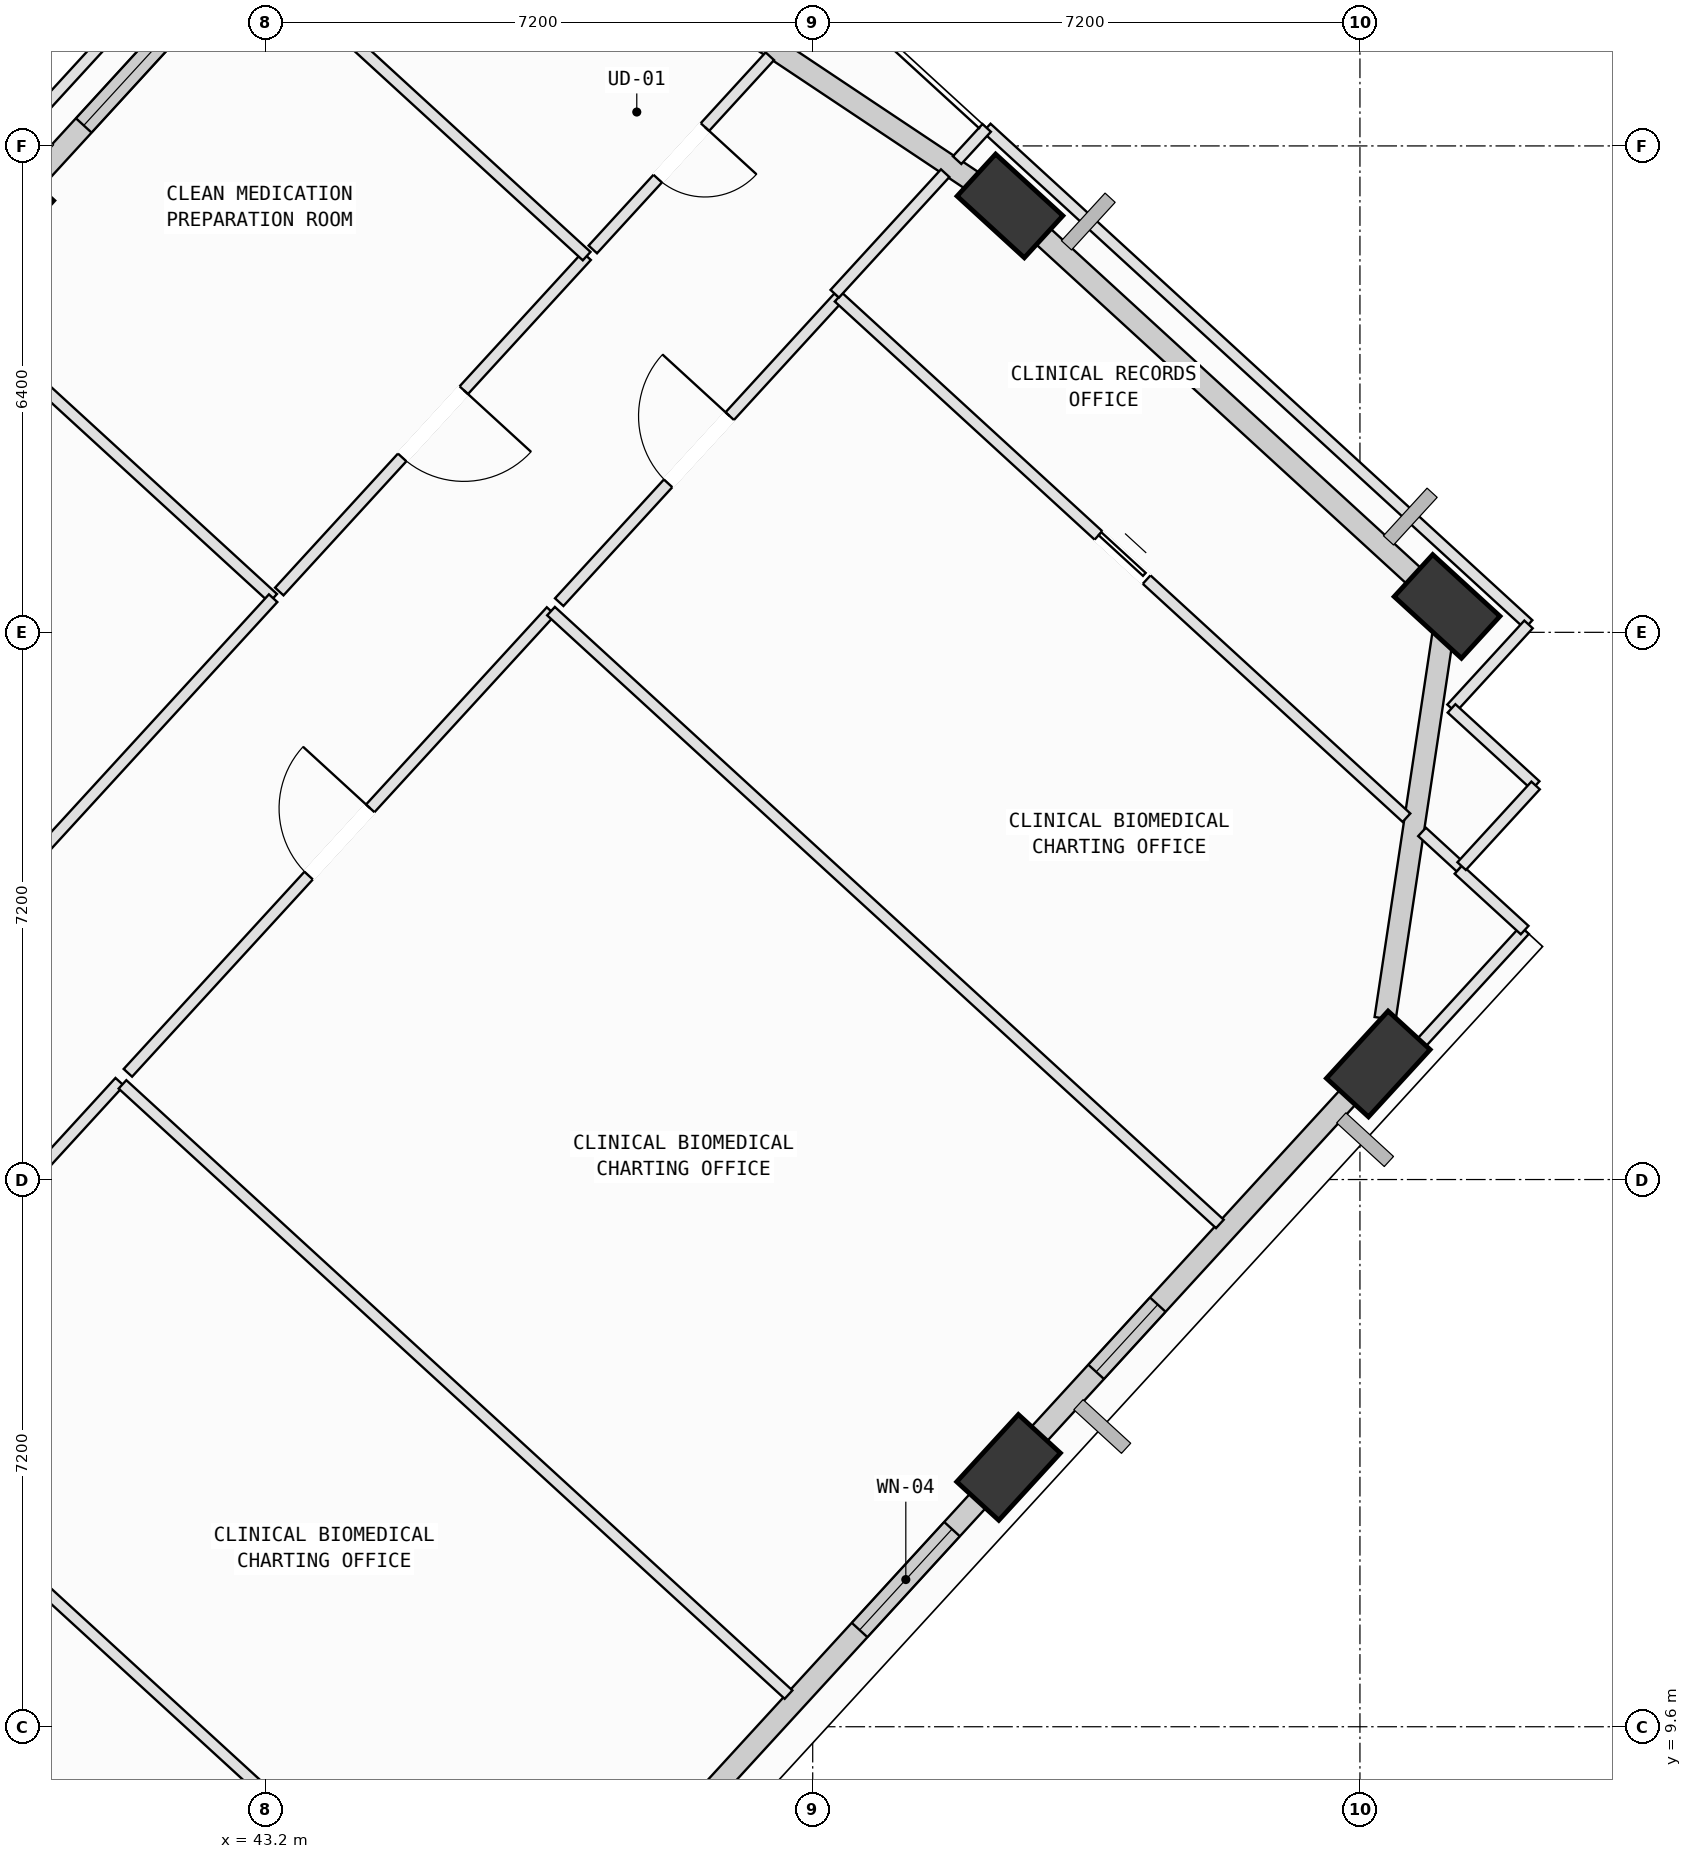
"""IFC4 building model, lengths in metres.
Left out: names, types, materials, properties, quantities, classifications, styles, units other than length and angle.
Written with IfcOpenShell. Run it as: python <this file> out.ifc"""

import sys

from ifc_helpers import new_model, si_unit, direction, frame, frame_2d, origin, origin_2d, place, context, subcontext, project, spatial, rectangle, extrude, element, fill, save


model = new_model("IFC4")
c1 = context("Model", 3, precision=1e-05, world=origin(), true_north=direction((0.0, 1.0)))
c2 = subcontext(c1, "Body", "Model", "MODEL_VIEW")
j1 = project(units=[si_unit("LENGTHUNIT", "METRE"), si_unit("PLANEANGLEUNIT", "RADIAN")], contexts=[c1])
p1 = place(None, origin())
s1 = spatial("IfcSite", under=j1, at=p1, CompositionType="ELEMENT")
p2 = place(p1, origin())
s2 = spatial("IfcBuilding", under=s1, at=p2, CompositionType="ELEMENT")
p3 = place(p2, frame((0.0, 0.0, 227.2)))
s3 = spatial("IfcBuildingStorey", under=s2, at=p3, CompositionType="ELEMENT", Elevation=227.2)
p4 = place(p3, frame((52.977, 13.012, 0.002), z_axis=(0.047989081714, 0.080407561502, 0.995606183232), x_axis=(-0.956311257313, -0.284081872205, 0.069038170754)))
e1 = element("IfcColumn", 1, at=p4, inside=s3, PredefinedType="COLUMN", context=c2, shape_type="SweptSolid", body=[
    extrude(rectangle(XDim=1.2, YDim=0.75, at=origin_2d()), origin(), (0.0, 0.0, 1.0), 4.014),
])
p5 = place(p3, frame((57.841, 18.321, 0.002), z_axis=(0.025885225997, 0.100138151274, 0.994636770753), x_axis=(-0.837618446054, -0.540906931878, 0.076256343195)))
e2 = element("IfcColumn", 2, at=p5, inside=s3, PredefinedType="COLUMN", context=c2, shape_type="SweptSolid", body=[
    extrude(rectangle(XDim=1.2, YDim=0.75, at=origin_2d()), origin(), (0.0, 0.0, 1.0), 4.018),
])
p6 = place(p3, frame((58.746, 24.341, 0.002), z_axis=(0.001032953055, 0.103659877118, 0.994612267612), x_axis=(0.730545196332, -0.679263427848, 0.07003507481)))
e3 = element("IfcColumn", 3, at=p6, inside=s3, PredefinedType="COLUMN", context=c2, shape_type="SweptSolid", body=[
    extrude(rectangle(XDim=1.2, YDim=0.75, at=origin_2d()), origin(), (0.0, 0.0, 1.0), 4.018),
])
p7 = place(p3, frame((52.995, 29.611, 0.002), z_axis=(-0.020517462965, 0.079938958081, 0.996588579452), x_axis=(0.881513138055, -0.468855845143, 0.05575646968)))
e4 = element("IfcColumn", 4, at=p7, inside=s3, PredefinedType="COLUMN", context=c2, shape_type="SweptSolid", body=[
    extrude(rectangle(XDim=1.2, YDim=0.75, at=origin_2d()), origin(), (0.0, 0.0, 1.0), 4.01),
])
p8 = place(p3, frame((52.834, 12.856, 0.0), z_axis=(0.0, 0.0, 1.0), x_axis=(-0.675586571209, -0.737280668946, 0.0)))
e5 = element("IfcWall", 5, at=p8, inside=s3, PredefinedType="SOLIDWALL", context=c2, shape_type="SweptSolid", body=[
    extrude(rectangle(XDim=6.407, YDim=0.28, at=frame_2d((3.203, 0.0))), origin(), (0.0, 0.0, 1.0), 3.265),
])
p9 = place(p8, frame((0.89, 0.0, 0.75)))
e6 = element("IfcOpeningElement", 6, at=p9, cuts=e5, PredefinedType="OPENING", context=c2, shape_type="SweptSolid", body=[
    extrude(rectangle(XDim=1.8, YDim=2.05, at=frame_2d((0.9, 1.025))), frame((0.0, 0.15, 0.0), z_axis=(0.0, -1.0, 0.0), x_axis=(1.0, 0.0, 0.0)), (0.0, 0.0, 1.0), 0.3),
])
p10 = place(p3, frame((57.705, 18.172, 0.0), z_axis=(0.0, 0.0, 1.0), x_axis=(-0.675585097516, -0.737282019321, 0.0)))
e7 = element("IfcWall", 7, at=p10, inside=s3, PredefinedType="SOLIDWALL", context=c2, shape_type="SweptSolid", body=[
    extrude(rectangle(XDim=6.418, YDim=0.28, at=frame_2d((3.209, 0.0))), origin(), (0.0, 0.0, 1.0), 3.265),
])
p11 = place(p10, frame((4.093, 0.0, 0.75)))
e8 = element("IfcOpeningElement", 8, at=p11, cuts=e7, PredefinedType="OPENING", context=c2, shape_type="SweptSolid", body=[
    extrude(rectangle(XDim=1.2, YDim=1.75, at=frame_2d((0.6, 0.875))), frame((0.0, 0.15, 0.0), z_axis=(0.0, -1.0, 0.0), x_axis=(1.0, 0.0, 0.0)), (0.0, 0.0, 1.0), 0.3),
])
p12 = place(p3, frame((58.718, 24.153, 0.0), z_axis=(0.0, 0.0, 1.0), x_axis=(-0.148680965194, -0.988885216084, 0.0)))
e9 = element("IfcWall", 9, at=p12, inside=s3, PredefinedType="SOLIDWALL", context=c2, shape_type="SweptSolid", body=[
    extrude(rectangle(XDim=5.294, YDim=0.28, at=frame_2d((2.647, 0.0))), origin(), (0.0, 0.0, 1.0), 3.265),
])
p13 = place(p3, frame((53.179, 29.443, 0.0), z_axis=(0.0, 0.0, 1.0), x_axis=(0.737270624316, -0.675597532945, 0.0)))
e10 = element("IfcWall", 10, at=p13, inside=s3, PredefinedType="SOLIDWALL", context=c2, shape_type="SweptSolid", body=[
    extrude(rectangle(XDim=7.046, YDim=0.28, at=frame_2d((3.523, 0.0))), origin(), (0.0, 0.0, 1.0), 3.265),
])
p14 = place(p3, frame((45.058, 34.906, 0.0), z_axis=(0.0, 0.0, 1.0), x_axis=(0.831863197992, -0.554980738249, 0.0)))
e11 = element("IfcWall", 11, at=p14, inside=s3, PredefinedType="SOLIDWALL", context=c2, shape_type="SweptSolid", body=[
    extrude(rectangle(XDim=9.036, YDim=0.28, at=frame_2d((4.518, 0.0))), origin(), (0.0, 0.0, 1.0), 3.265),
])
p15 = place(p3, frame((40.002, 29.789, 0.0), z_axis=(0.0, 0.0, 1.0), x_axis=(0.675590903353, 0.737276699283, 0.0)))
e12 = element("IfcWall", 12, at=p15, inside=s3, PredefinedType="SOLIDWALL", context=c2, shape_type="SweptSolid", body=[
    extrude(rectangle(XDim=6.78, YDim=0.28, at=frame_2d((3.39, 0.0))), origin(), (0.0, 0.0, 1.0), 3.165),
])
p16 = place(p15, frame((1.195, 0.0, 0.75)))
e13 = element("IfcOpeningElement", 13, at=p16, cuts=e12, PredefinedType="OPENING", context=c2, shape_type="SweptSolid", body=[
    extrude(rectangle(XDim=1.8, YDim=2.05, at=frame_2d((0.9, 1.025))), frame((0.0, 0.15, 0.0), z_axis=(0.0, -1.0, 0.0), x_axis=(1.0, 0.0, 0.0)), (0.0, 0.0, 1.0), 0.3),
])
p17 = place(p3, frame((37.499, 13.957, 0.0), z_axis=(0.0, 0.0, 1.0), x_axis=(0.737309503426, -0.675555102237, 0.0)))
e14 = element("IfcWall", 14, at=p17, inside=s3, PredefinedType="PARTITIONING", context=c2, shape_type="SweptSolid", body=[
    extrude(rectangle(XDim=11.935, YDim=0.15, at=frame_2d((5.968, 0.0))), origin(), (0.0, 0.0, 1.0), 3.78),
])
p18 = place(p3, frame((37.607, 14.075, 0.0), z_axis=(0.0, 0.0, 1.0), x_axis=(0.67555593544, 0.737308740008, 0.0)))
e15 = element("IfcWall", 15, at=p18, inside=s3, PredefinedType="PARTITIONING", context=c2, shape_type="SweptSolid", body=[
    extrude(rectangle(XDim=5.44, YDim=0.15, at=frame_2d((2.72, 0.0))), origin(), (0.0, 0.0, 1.0), 3.78),
])
p19 = place(p18, frame((2.12, 0.0, 0.0)))
e16 = element("IfcOpeningElement", 16, at=p19, cuts=e15, PredefinedType="OPENING", context=c2, shape_type="SweptSolid", body=[
    extrude(rectangle(XDim=1.2, YDim=2.15, at=frame_2d((0.6, 1.075))), frame((0.0, 0.085, 0.0), z_axis=(0.0, -1.0, 0.0), x_axis=(1.0, 0.0, 0.0)), (0.0, 0.0, 1.0), 0.17),
])
p20 = place(p3, frame((41.319, 18.052, 0.0), z_axis=(0.0, 0.0, 1.0), x_axis=(0.73730675083, -0.675558106443, 0.0)))
e17 = element("IfcWall", 17, at=p20, inside=s3, PredefinedType="PARTITIONING", context=c2, shape_type="SweptSolid", body=[
    extrude(rectangle(XDim=11.885, YDim=0.15, at=frame_2d((5.942, 0.0))), origin(), (0.0, 0.0, 1.0), 3.78),
])
p21 = place(p3, frame((41.39, 18.204, 0.0), z_axis=(0.0, 0.0, 1.0), x_axis=(0.67562131305, 0.737248832724, 0.0)))
e18 = element("IfcWall", 18, at=p21, inside=s3, PredefinedType="PARTITIONING", context=c2, shape_type="SweptSolid", body=[
    extrude(rectangle(XDim=8.24, YDim=0.15, at=frame_2d((4.12, 0.0))), origin(), (0.0, 0.0, 1.0), 3.78),
])
p22 = place(p21, frame((3.52, 0.0, 0.0)))
e19 = element("IfcOpeningElement", 19, at=p22, cuts=e18, PredefinedType="OPENING", context=c2, shape_type="SweptSolid", body=[
    extrude(rectangle(XDim=1.2, YDim=2.15, at=frame_2d((0.6, 1.075))), frame((0.0, 0.085, 0.0), z_axis=(0.0, -1.0, 0.0), x_axis=(1.0, 0.0, 0.0)), (0.0, 0.0, 1.0), 0.17),
])
p23 = place(p3, frame((46.957, 24.279, 0.0), z_axis=(0.0, 0.0, 1.0), x_axis=(0.737309503426, -0.675555102237, 0.0)))
e20 = element("IfcWall", 20, at=p23, inside=s3, PredefinedType="PARTITIONING", context=c2, shape_type="SweptSolid", body=[
    extrude(rectangle(XDim=11.935, YDim=0.15, at=frame_2d((5.968, 0.0))), origin(), (0.0, 0.0, 1.0), 3.78),
])
p24 = place(p3, frame((53.538, 13.285, 0.0), z_axis=(0.0, 0.0, 1.0), x_axis=(-0.675612964581, -0.737256483247, 0.0)))
e21 = element("IfcWall", 21, at=p24, inside=s3, PredefinedType="PARTITIONING", context=c2, shape_type="SweptSolid", body=[
    extrude(rectangle(XDim=0.792, YDim=0.15, at=frame_2d((0.396, 0.0))), origin(), (0.0, 0.0, 1.0), 3.265),
])
p25 = place(p3, frame((59.767, 20.082, 0.0), z_axis=(0.0, 0.0, 1.0), x_axis=(-0.675764091875, -0.737117963512, 0.0)))
e22 = element("IfcWall", 22, at=p25, inside=s3, PredefinedType="PARTITIONING", context=c2, shape_type="SweptSolid", body=[
    extrude(rectangle(XDim=2.801, YDim=0.15, at=frame_2d((1.401, 0.0))), origin(), (0.0, 0.0, 1.0), 3.265),
])
p26 = place(p3, frame((47.065, 24.397, 0.0), z_axis=(0.0, 0.0, 1.0), x_axis=(0.675653505822, 0.737219329691, 0.0)))
e23 = element("IfcWall", 23, at=p26, inside=s3, PredefinedType="PARTITIONING", context=c2, shape_type="SweptSolid", body=[
    extrude(rectangle(XDim=5.441, YDim=0.15, at=frame_2d((2.72, 0.0))), origin(), (0.0, 0.0, 1.0), 3.78),
])
p27 = place(p26, frame((2.12, 0.0, 0.0)))
e24 = element("IfcOpeningElement", 24, at=p27, cuts=e23, PredefinedType="OPENING", context=c2, shape_type="SweptSolid", body=[
    extrude(rectangle(XDim=1.2, YDim=2.15, at=frame_2d((0.6, 1.075))), frame((0.0, 0.085, 0.0), z_axis=(0.0, -1.0, 0.0), x_axis=(1.0, 0.0, 0.0)), (0.0, 0.0, 1.0), 0.17),
])
p28 = place(p3, frame((50.741, 28.408, 0.0), z_axis=(0.0, 0.0, 1.0), x_axis=(0.737225137983, -0.675647168221, 0.0)))
e25 = element("IfcWall", 25, at=p28, inside=s3, PredefinedType="PARTITIONING", context=c2, shape_type="SweptSolid", body=[
    extrude(rectangle(XDim=10.134, YDim=0.15, at=frame_2d((5.067, 0.0))), origin(), (0.0, 0.0, 1.0), 3.78),
])
p29 = place(p28, frame((4.637, 0.0, 0.0)))
e26 = element("IfcOpeningElement", 26, at=p29, cuts=e25, PredefinedType="OPENING", context=c2, shape_type="SweptSolid", body=[
    extrude(rectangle(XDim=0.86, YDim=2.06, at=frame_2d((0.43, 1.03))), frame((0.0, 0.085, 0.0), z_axis=(0.0, -1.0, 0.0), x_axis=(1.0, 0.0, 0.0)), (0.0, 0.0, 1.0), 0.17),
])
p30 = place(p3, frame((58.417, 21.374, 0.0), z_axis=(0.0, 0.0, 1.0), x_axis=(0.736962641312, -0.675933476986, 0.0)))
e27 = element("IfcWall", 27, at=p30, inside=s3, PredefinedType="PARTITIONING", context=c2, shape_type="SweptSolid", body=[
    extrude(rectangle(XDim=0.688, YDim=0.15, at=frame_2d((0.344, 0.0))), origin(), (0.0, 0.0, 1.0), 3.78),
])
p31 = place(p3, frame((58.897, 20.879, 0.0), z_axis=(0.0, 0.0, 1.0), x_axis=(0.737463271942, -0.67538723895, 0.0)))
e28 = element("IfcWall", 28, at=p31, inside=s3, PredefinedType="PARTITIONING", context=c2, shape_type="SweptSolid", body=[
    extrude(rectangle(XDim=1.18, YDim=0.15, at=frame_2d((0.59, 0.0))), origin(), (0.0, 0.0, 1.0), 3.78),
])
p32 = place(p3, frame((38.933, 28.452, 0.0), z_axis=(0.0, 0.0, 1.0), x_axis=(0.737237948412, -0.675633189993, 0.0)))
e29 = element("IfcWall", 29, at=p32, inside=s3, PredefinedType="PARTITIONING", context=c2, shape_type="SweptSolid", body=[
    extrude(rectangle(XDim=5.925, YDim=0.15, at=frame_2d((2.962, 0.0))), origin(), (0.0, 0.0, 1.0), 3.78),
])
p33 = place(p3, frame((43.301, 24.449, 0.0), z_axis=(0.0, 0.0, 1.0), x_axis=(-0.675529956825, -0.737332541959, 0.0)))
e30 = element("IfcWall", 30, at=p33, inside=s3, PredefinedType="PARTITIONING", context=c2, shape_type="SweptSolid", body=[
    extrude(rectangle(XDim=5.112, YDim=0.15, at=frame_2d((2.556, 0.0))), origin(), (0.0, 0.0, 1.0), 3.78),
])
p34 = place(p3, frame((47.426, 28.95, 0.0), z_axis=(0.0, 0.0, 1.0), x_axis=(-0.675619341334, -0.737250639617, 0.0)))
e31 = element("IfcWall", 31, at=p34, inside=s3, PredefinedType="PARTITIONING", context=c2, shape_type="SweptSolid", body=[
    extrude(rectangle(XDim=5.986, YDim=0.15, at=frame_2d((2.993, 0.0))), origin(), (0.0, 0.0, 1.0), 3.78),
])
p35 = place(p34, frame((2.393, 0.0, 0.0)))
e32 = element("IfcOpeningElement", 32, at=p35, cuts=e31, PredefinedType="OPENING", context=c2, shape_type="SweptSolid", body=[
    extrude(rectangle(XDim=1.2, YDim=2.15, at=frame_2d((0.6, 1.075))), frame((0.0, 0.085, 0.0), z_axis=(0.0, -1.0, 0.0), x_axis=(1.0, 0.0, 0.0)), (0.0, 0.0, 1.0), 0.17),
])
p36 = place(p3, frame((38.524, 28.989, 0.0), z_axis=(0.0, 0.0, 1.0), x_axis=(0.675510328169, 0.737350524878, 0.0)))
e33 = element("IfcWall", 33, at=p36, inside=s3, PredefinedType="PARTITIONING", context=c2, shape_type="SweptSolid", body=[
    extrude(rectangle(XDim=5.985, YDim=0.15, at=frame_2d((2.993, 0.0))), origin(), (0.0, 0.0, 1.0), 3.265),
])
p37 = place(p3, frame((43.058, 32.953, 0.0), z_axis=(0.0, 0.0, 1.0), x_axis=(0.737237948412, -0.675633189993, 0.0)))
e34 = element("IfcWall", 34, at=p37, inside=s3, PredefinedType="PARTITIONING", context=c2, shape_type="SweptSolid", body=[
    extrude(rectangle(XDim=5.925, YDim=0.15, at=frame_2d((2.962, 0.0))), origin(), (0.0, 0.0, 1.0), 3.78),
])
p38 = place(p3, frame((49.836, 31.58, 0.0), z_axis=(0.0, 0.0, 1.0), x_axis=(-0.675519367859, -0.737342243227, 0.0)))
e35 = element("IfcWall", 35, at=p38, inside=s3, PredefinedType="PARTITIONING", context=c2, shape_type="SweptSolid", body=[
    extrude(rectangle(XDim=3.448, YDim=0.15, at=frame_2d((1.724, 0.0))), origin(), (0.0, 0.0, 1.0), 3.78),
])
p39 = place(p38, frame((1.264, 0.0, 0.0)))
e36 = element("IfcOpeningElement", 36, at=p39, cuts=e35, PredefinedType="OPENING", context=c2, shape_type="SweptSolid", body=[
    extrude(rectangle(XDim=0.92, YDim=2.1, at=frame_2d((0.46, 1.05))), frame((0.0, 0.085, 0.0), z_axis=(0.0, -1.0, 0.0), x_axis=(1.0, 0.0, 0.0)), (0.0, 0.0, 1.0), 0.17),
])
p40 = place(p3, frame((52.689, 30.637, 0.0), z_axis=(0.0, 0.0, 1.0), x_axis=(0.737262077206, -0.675606860174, 0.0)))
e37 = element("IfcWall", 37, at=p40, inside=s3, PredefinedType="PARTITIONING", context=c2, shape_type="SweptSolid", body=[
    extrude(rectangle(XDim=9.67, YDim=0.15, at=frame_2d((4.835, 0.0))), origin(), (0.0, 0.0, 1.0), 3.265),
])
p41 = place(p3, frame((59.818, 24.104, 0.0), z_axis=(0.0, 0.0, 1.0), x_axis=(-0.6758278627, -0.737059495562, 0.0)))
e38 = element("IfcWall", 38, at=p41, inside=s3, PredefinedType="PARTITIONING", context=c2, shape_type="SweptSolid", body=[
    extrude(rectangle(XDim=1.499, YDim=0.15, at=frame_2d((0.75, 0.0))), origin(), (0.0, 0.0, 1.0), 3.78),
])
p42 = place(p3, frame((58.805, 22.999, 0.0), z_axis=(0.0, 0.0, 1.0), x_axis=(0.737113612824, -0.67576883754, 0.0)))
e39 = element("IfcWall", 39, at=p42, inside=s3, PredefinedType="PARTITIONING", context=c2, shape_type="SweptSolid", body=[
    extrude(rectangle(XDim=1.5, YDim=0.15, at=frame_2d((0.75, 0.0))), origin(), (0.0, 0.0, 1.0), 3.78),
])
p43 = place(p3, frame((59.911, 21.985, 0.0), z_axis=(0.0, 0.0, 1.0), x_axis=(-0.675832137534, -0.73705557584, 0.0)))
e40 = element("IfcWall", 40, at=p43, inside=s3, PredefinedType="PARTITIONING", context=c2, shape_type="SweptSolid", body=[
    extrude(rectangle(XDim=1.439, YDim=0.15, at=frame_2d((0.72, 0.0))), origin(), (0.0, 0.0, 1.0), 3.78),
])
p44 = place(p3, frame((50.69, 28.455, 0.0), z_axis=(0.0, 0.0, 1.0), x_axis=(0.675560141792, 0.737304885934, 0.0)))
e41 = element("IfcWall", 41, at=p44, inside=s3, PredefinedType="PARTITIONING", context=c2, shape_type="SweptSolid", body=[
    extrude(rectangle(XDim=2.151, YDim=0.15, at=frame_2d((1.075, 0.0))), origin(), (0.0, 0.0, 1.0), 3.78),
])
p45 = place(p3, frame((52.3, 30.213, 0.0), z_axis=(0.0, 0.0, 1.0), x_axis=(0.675897529025, 0.736995610745, 0.0)))
e42 = element("IfcWall", 42, at=p45, inside=s3, PredefinedType="PARTITIONING", context=c2, shape_type="SweptSolid", body=[
    extrude(rectangle(XDim=0.575, YDim=0.15, at=frame_2d((0.288, 0.0))), origin(), (0.0, 0.0, 1.0), 3.78),
])
p46 = place(p9, origin())
e43 = element("IfcWindow", 43, at=p46, inside=s3, PartitioningType="SINGLE_PANEL", PredefinedType="WINDOW", context=c2, shape_type="SweptSolid", body=[
    extrude(rectangle(XDim=1.8, YDim=2.05, at=frame_2d((0.9, 1.025))), frame((0.0, 0.03, 0.0), z_axis=(0.0, -1.0, 0.0), x_axis=(1.0, 0.0, 0.0)), (0.0, 0.0, 1.0), 0.06),
])
fill(e6, e43)
p47 = place(p11, origin())
e44 = element("IfcWindow", 44, at=p47, inside=s3, PartitioningType="SINGLE_PANEL", PredefinedType="WINDOW", context=c2, shape_type="SweptSolid", body=[
    extrude(rectangle(XDim=1.2, YDim=1.75, at=frame_2d((0.6, 0.875))), frame((0.0, 0.03, 0.0), z_axis=(0.0, -1.0, 0.0), x_axis=(1.0, 0.0, 0.0)), (0.0, 0.0, 1.0), 0.06),
])
fill(e8, e44)
p48 = place(p16, origin())
e45 = element("IfcWindow", 45, at=p48, inside=s3, PartitioningType="SINGLE_PANEL", PredefinedType="WINDOW", context=c2, shape_type="SweptSolid", body=[
    extrude(rectangle(XDim=1.8, YDim=2.05, at=frame_2d((0.9, 1.025))), frame((0.0, 0.03, 0.0), z_axis=(0.0, -1.0, 0.0), x_axis=(1.0, 0.0, 0.0)), (0.0, 0.0, 1.0), 0.06),
])
fill(e13, e45)
p49 = place(p22, origin())
e46 = element("IfcDoor", 46, at=p49, inside=s3, OperationType="SINGLE_SWING_RIGHT", PredefinedType="DOOR", context=c2, shape_type="SweptSolid", body=[
    extrude(rectangle(XDim=1.2, YDim=2.15, at=frame_2d((0.6, 1.075))), frame((0.0, 0.025, 0.0), z_axis=(0.0, -1.0, 0.0), x_axis=(1.0, 0.0, 0.0)), (0.0, 0.0, 1.0), 0.05),
])
fill(e19, e46)
p50 = place(p27, origin())
e47 = element("IfcDoor", 47, at=p50, inside=s3, OperationType="SINGLE_SWING_RIGHT", PredefinedType="DOOR", context=c2, shape_type="SweptSolid", body=[
    extrude(rectangle(XDim=1.2, YDim=2.15, at=frame_2d((0.6, 1.075))), frame((0.0, 0.025, 0.0), z_axis=(0.0, -1.0, 0.0), x_axis=(1.0, 0.0, 0.0)), (0.0, 0.0, 1.0), 0.05),
])
fill(e24, e47)
p51 = place(p35, origin())
e48 = element("IfcDoor", 48, at=p51, inside=s3, OperationType="SINGLE_SWING_LEFT", PredefinedType="DOOR", context=c2, shape_type="SweptSolid", body=[
    extrude(rectangle(XDim=1.2, YDim=2.15, at=frame_2d((0.6, 1.075))), frame((0.0, 0.025, 0.0), z_axis=(0.0, -1.0, 0.0), x_axis=(1.0, 0.0, 0.0)), (0.0, 0.0, 1.0), 0.05),
])
fill(e32, e48)
p52 = place(p39, origin())
e49 = element("IfcDoor", 49, at=p52, inside=s3, OperationType="SINGLE_SWING_LEFT", PredefinedType="DOOR", context=c2, shape_type="SweptSolid", body=[
    extrude(rectangle(XDim=0.92, YDim=2.1, at=frame_2d((0.46, 1.05))), frame((0.0, 0.025, 0.0), z_axis=(0.0, -1.0, 0.0), x_axis=(1.0, 0.0, 0.0)), (0.0, 0.0, 1.0), 0.05),
])
fill(e36, e49)
p53 = place(p29, origin())
e50 = element("IfcDoor", 50, at=p53, inside=s3, OperationType="SLIDING_TO_LEFT", PredefinedType="DOOR", context=c2, shape_type="SweptSolid", body=[
    extrude(rectangle(XDim=0.86, YDim=2.06, at=frame_2d((0.43, 1.03))), frame((0.0, 0.025, 0.0), z_axis=(0.0, -1.0, 0.0), x_axis=(1.0, 0.0, 0.0)), (0.0, 0.0, 1.0), 0.05),
])
fill(e26, e50)
save(model, sys.argv[1])
